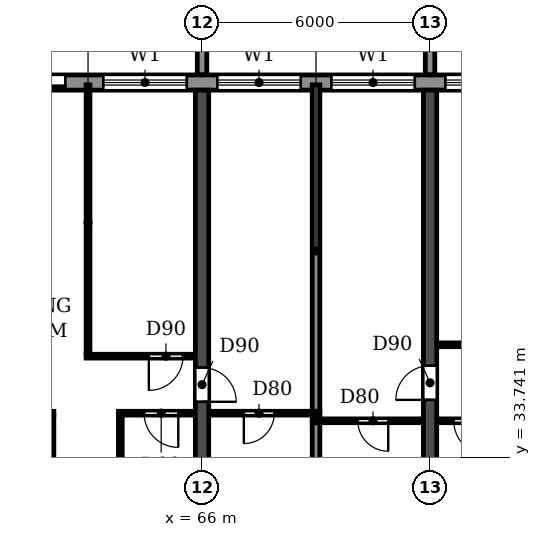
"""IFC4 building model, lengths in metres.
Left out: names, types, materials, properties, quantities, classifications, styles, units other than length and angle.
Written with IfcOpenShell. Run it as: python <this file> out.ifc"""

import sys

from ifc_helpers import new_model, si_unit, direction, frame, frame_2d, origin, place, context, subcontext, project, spatial, polyline, rectangle, outline, extrude, source, transform, mapped, element, fill, save


model = new_model("IFC4")
c1 = context("Model", 3, precision=1e-05, world=origin(), true_north=direction((0.0, 1.0)))
c2 = subcontext(c1, "Body", "Model", "MODEL_VIEW")
j1 = project(units=[si_unit("LENGTHUNIT", "METRE"), si_unit("PLANEANGLEUNIT", "RADIAN")], contexts=[c1])
p1 = place(None, origin())
s1 = spatial("IfcSite", under=j1, at=p1, CompositionType="ELEMENT")
p2 = place(p1, origin())
s2 = spatial("IfcBuilding", under=s1, at=p2, CompositionType="ELEMENT")
p3 = place(p2, frame((0.0, 0.0, 82.8)))
s3 = spatial("IfcBuildingStorey", under=s2, at=p3, CompositionType="ELEMENT", Elevation=82.8)
p4 = place(p3, frame((66.0, 30.525, 0.0), z_axis=(0.0, 0.0, 1.0), x_axis=(0.0, 1.0, 0.0)))
e1 = element("IfcWall", 1, at=p4, inside=s3, PredefinedType="SHEAR", context=c2, shape_type="SweptSolid", body=[
    extrude(rectangle(XDim=12.875, YDim=0.35, at=frame_2d((6.438, 0.0))), origin(), (0.0, 0.0, 1.0), 3.06),
])
p5 = place(p4, frame((4.675, 0.0, 0.0)))
e2 = element("IfcOpeningElement", 2, at=p5, cuts=e1, PredefinedType="OPENING", context=c2, shape_type="SweptSolid", body=[
    extrude(rectangle(XDim=0.9, YDim=2.1, at=frame_2d((0.45, 1.05))), frame((0.0, 0.185, 0.0), z_axis=(0.0, -1.0, 0.0), x_axis=(1.0, 0.0, 0.0)), (0.0, 0.0, 1.0), 0.37),
])
p6 = place(p3, frame((72.0, 30.525, 0.0), z_axis=(0.0, 0.0, 1.0), x_axis=(0.0, 1.0, 0.0)))
e3 = element("IfcWall", 3, at=p6, inside=s3, PredefinedType="SHEAR", context=c2, shape_type="SweptSolid", body=[
    extrude(rectangle(XDim=12.875, YDim=0.35, at=frame_2d((6.438, 0.0))), origin(), (0.0, 0.0, 1.0), 3.06),
])
p7 = place(p6, frame((4.725, 0.0, 0.0)))
e4 = element("IfcOpeningElement", 4, at=p7, cuts=e3, PredefinedType="OPENING", context=c2, shape_type="SweptSolid", body=[
    extrude(rectangle(XDim=0.9, YDim=2.1, at=frame_2d((0.45, 1.05))), frame((0.0, 0.185, 0.0), z_axis=(0.0, -1.0, 0.0), x_axis=(1.0, 0.0, 0.0)), (0.0, 0.0, 1.0), 0.37),
])
p8 = place(p3, frame((91.317, 43.6, 0.0), z_axis=(0.0, 0.0, 1.0), x_axis=(-1.0, 0.0, 0.0)))
e5 = element("IfcWall", 5, at=p8, inside=s3, PredefinedType="STANDARD", context=c2, shape_type="SweptSolid", body=[
    extrude(rectangle(XDim=80.634, YDim=0.4, at=frame_2d((40.317, 0.0))), origin(), (0.0, 0.0, 1.0), 3.06),
])
p9 = place(p8, frame((76.717, 0.0, 0.9)))
e6 = element("IfcOpeningElement", 6, at=p9, cuts=e5, PredefinedType="OPENING", context=c2, shape_type="SweptSolid", body=[
    extrude(rectangle(XDim=2.2, YDim=1.5, at=frame_2d((1.1, 0.75))), frame((0.0, 0.21, 0.0), z_axis=(0.0, -1.0, 0.0), x_axis=(1.0, 0.0, 0.0)), (0.0, 0.0, 1.0), 0.42),
])
p10 = place(p8, frame((73.917, 0.0, 0.0)))
e7 = element("IfcOpeningElement", 7, at=p10, cuts=e5, PredefinedType="OPENING", context=c2, shape_type="SweptSolid", body=[
    extrude(rectangle(XDim=1.8, YDim=2.4, at=frame_2d((0.9, 1.2))), frame((0.0, 0.21, 0.0), z_axis=(0.0, -1.0, 0.0), x_axis=(1.0, 0.0, 0.0)), (0.0, 0.0, 1.0), 0.42),
])
p11 = place(p8, frame((70.717, 0.0, 0.9)))
e8 = element("IfcOpeningElement", 8, at=p11, cuts=e5, PredefinedType="OPENING", context=c2, shape_type="SweptSolid", body=[
    extrude(rectangle(XDim=2.2, YDim=1.5, at=frame_2d((1.1, 0.75))), frame((0.0, 0.21, 0.0), z_axis=(0.0, -1.0, 0.0), x_axis=(1.0, 0.0, 0.0)), (0.0, 0.0, 1.0), 0.42),
])
p12 = place(p8, frame((67.717, 0.0, 0.9)))
e9 = element("IfcOpeningElement", 9, at=p12, cuts=e5, PredefinedType="OPENING", context=c2, shape_type="SweptSolid", body=[
    extrude(rectangle(XDim=2.2, YDim=1.5, at=frame_2d((1.1, 0.75))), frame((0.0, 0.21, 0.0), z_axis=(0.0, -1.0, 0.0), x_axis=(1.0, 0.0, 0.0)), (0.0, 0.0, 1.0), 0.42),
])
p13 = place(p8, frame((64.717, 0.0, 0.9)))
e10 = element("IfcOpeningElement", 10, at=p13, cuts=e5, PredefinedType="OPENING", context=c2, shape_type="SweptSolid", body=[
    extrude(rectangle(XDim=2.2, YDim=1.5, at=frame_2d((1.1, 0.75))), frame((0.0, 0.21, 0.0), z_axis=(0.0, -1.0, 0.0), x_axis=(1.0, 0.0, 0.0)), (0.0, 0.0, 1.0), 0.42),
])
p14 = place(p8, frame((61.917, 0.0, 0.0)))
e11 = element("IfcOpeningElement", 11, at=p14, cuts=e5, PredefinedType="OPENING", context=c2, shape_type="SweptSolid", body=[
    extrude(rectangle(XDim=1.8, YDim=2.4, at=frame_2d((0.9, 1.2))), frame((0.0, 0.21, 0.0), z_axis=(0.0, -1.0, 0.0), x_axis=(1.0, 0.0, 0.0)), (0.0, 0.0, 1.0), 0.42),
])
p15 = place(p8, frame((58.917, 0.0, 0.0)))
e12 = element("IfcOpeningElement", 12, at=p15, cuts=e5, PredefinedType="OPENING", context=c2, shape_type="SweptSolid", body=[
    extrude(rectangle(XDim=1.8, YDim=2.4, at=frame_2d((0.9, 1.2))), frame((0.0, 0.21, 0.0), z_axis=(0.0, -1.0, 0.0), x_axis=(1.0, 0.0, 0.0)), (0.0, 0.0, 1.0), 0.42),
])
p16 = place(p8, frame((55.717, 0.0, 0.9)))
e13 = element("IfcOpeningElement", 13, at=p16, cuts=e5, PredefinedType="OPENING", context=c2, shape_type="SweptSolid", body=[
    extrude(rectangle(XDim=2.2, YDim=1.5, at=frame_2d((1.1, 0.75))), frame((0.0, 0.21, 0.0), z_axis=(0.0, -1.0, 0.0), x_axis=(1.0, 0.0, 0.0)), (0.0, 0.0, 1.0), 0.42),
])
p17 = place(p8, frame((52.717, 0.0, 0.9)))
e14 = element("IfcOpeningElement", 14, at=p17, cuts=e5, PredefinedType="OPENING", context=c2, shape_type="SweptSolid", body=[
    extrude(rectangle(XDim=2.2, YDim=1.5, at=frame_2d((1.1, 0.75))), frame((0.0, 0.21, 0.0), z_axis=(0.0, -1.0, 0.0), x_axis=(1.0, 0.0, 0.0)), (0.0, 0.0, 1.0), 0.42),
])
p18 = place(p8, frame((49.917, 0.0, 0.0)))
e15 = element("IfcOpeningElement", 15, at=p18, cuts=e5, PredefinedType="OPENING", context=c2, shape_type="SweptSolid", body=[
    extrude(rectangle(XDim=1.8, YDim=2.4, at=frame_2d((0.9, 1.2))), frame((0.0, 0.21, 0.0), z_axis=(0.0, -1.0, 0.0), x_axis=(1.0, 0.0, 0.0)), (0.0, 0.0, 1.0), 0.42),
])
p19 = place(p8, frame((46.717, 0.0, 0.9)))
e16 = element("IfcOpeningElement", 16, at=p19, cuts=e5, PredefinedType="OPENING", context=c2, shape_type="SweptSolid", body=[
    extrude(rectangle(XDim=2.2, YDim=1.5, at=frame_2d((1.1, 0.75))), frame((0.0, 0.21, 0.0), z_axis=(0.0, -1.0, 0.0), x_axis=(1.0, 0.0, 0.0)), (0.0, 0.0, 1.0), 0.42),
])
p20 = place(p8, frame((43.717, 0.0, 0.9)))
e17 = element("IfcOpeningElement", 17, at=p20, cuts=e5, PredefinedType="OPENING", context=c2, shape_type="SweptSolid", body=[
    extrude(rectangle(XDim=2.2, YDim=1.5, at=frame_2d((1.1, 0.75))), frame((0.0, 0.21, 0.0), z_axis=(0.0, -1.0, 0.0), x_axis=(1.0, 0.0, 0.0)), (0.0, 0.0, 1.0), 0.42),
])
p21 = place(p8, frame((40.717, 0.0, 0.9)))
e18 = element("IfcOpeningElement", 18, at=p21, cuts=e5, PredefinedType="OPENING", context=c2, shape_type="SweptSolid", body=[
    extrude(rectangle(XDim=2.2, YDim=1.5, at=frame_2d((1.1, 0.75))), frame((0.0, 0.21, 0.0), z_axis=(0.0, -1.0, 0.0), x_axis=(1.0, 0.0, 0.0)), (0.0, 0.0, 1.0), 0.42),
])
p22 = place(p8, frame((37.917, 0.0, 0.0)))
e19 = element("IfcOpeningElement", 19, at=p22, cuts=e5, PredefinedType="OPENING", context=c2, shape_type="SweptSolid", body=[
    extrude(rectangle(XDim=1.8, YDim=2.4, at=frame_2d((0.9, 1.2))), frame((0.0, 0.21, 0.0), z_axis=(0.0, -1.0, 0.0), x_axis=(1.0, 0.0, 0.0)), (0.0, 0.0, 1.0), 0.42),
])
p23 = place(p8, frame((34.717, 0.0, 0.9)))
e20 = element("IfcOpeningElement", 20, at=p23, cuts=e5, PredefinedType="OPENING", context=c2, shape_type="SweptSolid", body=[
    extrude(rectangle(XDim=2.2, YDim=1.5, at=frame_2d((1.1, 0.75))), frame((0.0, 0.21, 0.0), z_axis=(0.0, -1.0, 0.0), x_axis=(1.0, 0.0, 0.0)), (0.0, 0.0, 1.0), 0.42),
])
p24 = place(p8, frame((31.717, 0.0, 0.9)))
e21 = element("IfcOpeningElement", 21, at=p24, cuts=e5, PredefinedType="OPENING", context=c2, shape_type="SweptSolid", body=[
    extrude(rectangle(XDim=2.2, YDim=1.5, at=frame_2d((1.1, 0.75))), frame((0.0, 0.21, 0.0), z_axis=(0.0, -1.0, 0.0), x_axis=(1.0, 0.0, 0.0)), (0.0, 0.0, 1.0), 0.42),
])
p25 = place(p8, frame((28.917, 0.0, 0.0)))
e22 = element("IfcOpeningElement", 22, at=p25, cuts=e5, PredefinedType="OPENING", context=c2, shape_type="SweptSolid", body=[
    extrude(rectangle(XDim=1.8, YDim=2.4, at=frame_2d((0.9, 1.2))), frame((0.0, 0.21, 0.0), z_axis=(0.0, -1.0, 0.0), x_axis=(1.0, 0.0, 0.0)), (0.0, 0.0, 1.0), 0.42),
])
p26 = place(p8, frame((25.717, 0.0, 0.9)))
e23 = element("IfcOpeningElement", 23, at=p26, cuts=e5, PredefinedType="OPENING", context=c2, shape_type="SweptSolid", body=[
    extrude(rectangle(XDim=2.2, YDim=1.5, at=frame_2d((1.1, 0.75))), frame((0.0, 0.21, 0.0), z_axis=(0.0, -1.0, 0.0), x_axis=(1.0, 0.0, 0.0)), (0.0, 0.0, 1.0), 0.42),
])
p27 = place(p8, frame((22.717, 0.0, 0.9)))
e24 = element("IfcOpeningElement", 24, at=p27, cuts=e5, PredefinedType="OPENING", context=c2, shape_type="SweptSolid", body=[
    extrude(rectangle(XDim=2.2, YDim=1.5, at=frame_2d((1.1, 0.75))), frame((0.0, 0.21, 0.0), z_axis=(0.0, -1.0, 0.0), x_axis=(1.0, 0.0, 0.0)), (0.0, 0.0, 1.0), 0.42),
])
p28 = place(p8, frame((19.717, 0.0, 0.9)))
e25 = element("IfcOpeningElement", 25, at=p28, cuts=e5, PredefinedType="OPENING", context=c2, shape_type="SweptSolid", body=[
    extrude(rectangle(XDim=2.2, YDim=1.5, at=frame_2d((1.1, 0.75))), frame((0.0, 0.21, 0.0), z_axis=(0.0, -1.0, 0.0), x_axis=(1.0, 0.0, 0.0)), (0.0, 0.0, 1.0), 0.42),
])
p29 = place(p8, frame((16.717, 0.0, 0.9)))
e26 = element("IfcOpeningElement", 26, at=p29, cuts=e5, PredefinedType="OPENING", context=c2, shape_type="SweptSolid", body=[
    extrude(rectangle(XDim=2.2, YDim=1.5, at=frame_2d((1.1, 0.75))), frame((0.0, 0.21, 0.0), z_axis=(0.0, -1.0, 0.0), x_axis=(1.0, 0.0, 0.0)), (0.0, 0.0, 1.0), 0.42),
])
p30 = place(p8, frame((13.917, 0.0, 0.0)))
e27 = element("IfcOpeningElement", 27, at=p30, cuts=e5, PredefinedType="OPENING", context=c2, shape_type="SweptSolid", body=[
    extrude(rectangle(XDim=1.8, YDim=2.4, at=frame_2d((0.9, 1.2))), frame((0.0, 0.21, 0.0), z_axis=(0.0, -1.0, 0.0), x_axis=(1.0, 0.0, 0.0)), (0.0, 0.0, 1.0), 0.42),
])
p31 = place(p8, frame((10.717, 0.0, 0.9)))
e28 = element("IfcOpeningElement", 28, at=p31, cuts=e5, PredefinedType="OPENING", context=c2, shape_type="SweptSolid", body=[
    extrude(rectangle(XDim=2.2, YDim=1.5, at=frame_2d((1.1, 0.75))), frame((0.0, 0.21, 0.0), z_axis=(0.0, -1.0, 0.0), x_axis=(1.0, 0.0, 0.0)), (0.0, 0.0, 1.0), 0.42),
])
p32 = place(p8, frame((7.717, 0.0, 0.9)))
e29 = element("IfcOpeningElement", 29, at=p32, cuts=e5, PredefinedType="OPENING", context=c2, shape_type="SweptSolid", body=[
    extrude(rectangle(XDim=2.2, YDim=1.5, at=frame_2d((1.1, 0.75))), frame((0.0, 0.21, 0.0), z_axis=(0.0, -1.0, 0.0), x_axis=(1.0, 0.0, 0.0)), (0.0, 0.0, 1.0), 0.42),
])
p33 = place(p8, frame((4.917, 0.0, 0.0)))
e30 = element("IfcOpeningElement", 30, at=p33, cuts=e5, PredefinedType="OPENING", context=c2, shape_type="SweptSolid", body=[
    extrude(rectangle(XDim=1.8, YDim=2.4, at=frame_2d((0.9, 1.2))), frame((0.0, 0.21, 0.0), z_axis=(0.0, -1.0, 0.0), x_axis=(1.0, 0.0, 0.0)), (0.0, 0.0, 1.0), 0.42),
])
p34 = place(p8, frame((1.717, 0.0, 0.9)))
e31 = element("IfcOpeningElement", 31, at=p34, cuts=e5, PredefinedType="OPENING", context=c2, shape_type="SweptSolid", body=[
    extrude(rectangle(XDim=2.2, YDim=1.5, at=frame_2d((1.1, 0.75))), frame((0.0, 0.21, 0.0), z_axis=(0.0, -1.0, 0.0), x_axis=(1.0, 0.0, 0.0)), (0.0, 0.0, 1.0), 0.42),
])
m1 = source(origin(), c2, "Body", "SweptSolid", [
    extrude(outline(polyline([(0.0, 0.0), (0.25, 0.0), (0.25, 3.1), (0.0, 3.1), (0.0, 0.0)])), origin(), (0.0, 0.0, 1.0), 3.1),
])
for number, where in (
    (32, (65.875, 43.8, 0.0)),
    (33, (71.875, 43.8, 0.0)),
):
    element("IfcWall", number, at=place(p3, frame(where)), inside=s3, PredefinedType="STANDARD", context=c2, shape_type="MappedRepresentation", body=[
        mapped(m1, transform((0.0, 0.0, 0.0))),
    ])
p35 = place(p3, frame((69.0, 30.535, 0.0), z_axis=(0.0, 0.0, 1.0), x_axis=(0.0, 1.0, 0.0)))
e34 = element("IfcWall", 34, at=p35, inside=s3, PredefinedType="PARTITIONING", context=c2, shape_type="SweptSolid", body=[
    extrude(rectangle(XDim=4.115, YDim=0.2, at=frame_2d((2.058, 0.0))), origin(), (0.0, 0.0, 1.0), 3.06),
])
p36 = place(p3, frame((69.0, 34.95, 0.0), z_axis=(0.0, 0.0, 1.0), x_axis=(0.0, 1.0, 0.0)))
e35 = element("IfcWall", 35, at=p36, inside=s3, PredefinedType="PARTITIONING", context=c2, shape_type="SweptSolid", body=[
    extrude(rectangle(XDim=8.59, YDim=0.2, at=frame_2d((4.295, 0.0))), origin(), (0.0, 0.0, 1.0), 3.06),
])
p37 = place(p3, frame((68.9, 34.7, 0.0), z_axis=(0.0, 0.0, 1.0), x_axis=(1.0, 0.0, 0.0)))
e36 = element("IfcWall", 36, at=p37, inside=s3, PredefinedType="PARTITIONING", context=c2, shape_type="SweptSolid", body=[
    extrude(rectangle(XDim=2.915, YDim=0.1, at=frame_2d((1.458, 0.0))), origin(), (0.0, 0.0, 1.0), 3.06),
])
p38 = place(p37, frame((1.2, 0.0, 0.0)))
e37 = element("IfcOpeningElement", 37, at=p38, cuts=e36, PredefinedType="OPENING", context=c2, shape_type="SweptSolid", body=[
    extrude(rectangle(XDim=0.8, YDim=2.1, at=frame_2d((0.4, 1.05))), frame((0.0, 0.06, 0.0), z_axis=(0.0, -1.0, 0.0), x_axis=(1.0, 0.0, 0.0)), (0.0, 0.0, 1.0), 0.12),
])
p39 = place(p3, frame((72.185, 34.7, 0.0), z_axis=(0.0, 0.0, 1.0), x_axis=(1.0, 0.0, 0.0)))
e38 = element("IfcWall", 38, at=p39, inside=s3, PredefinedType="PARTITIONING", context=c2, shape_type="SweptSolid", body=[
    extrude(rectangle(XDim=2.015, YDim=0.1, at=frame_2d((1.007, 0.0))), origin(), (0.0, 0.0, 1.0), 3.06),
])
p40 = place(p39, frame((0.44, 0.0, 0.0)))
e39 = element("IfcOpeningElement", 39, at=p40, cuts=e38, PredefinedType="OPENING", context=c2, shape_type="SweptSolid", body=[
    extrude(rectangle(XDim=0.9, YDim=2.1, at=frame_2d((0.45, 1.05))), frame((0.0, 0.06, 0.0), z_axis=(0.0, -1.0, 0.0), x_axis=(1.0, 0.0, 0.0)), (0.0, 0.0, 1.0), 0.12),
])
p41 = place(p3, frame((60.185, 34.9, 0.0), z_axis=(0.0, 0.0, 1.0), x_axis=(1.0, 0.0, 0.0)))
e40 = element("IfcWall", 40, at=p41, inside=s3, PredefinedType="PARTITIONING", context=c2, shape_type="SweptSolid", body=[
    extrude(rectangle(XDim=1.915, YDim=0.1, at=frame_2d((0.958, 0.0))), origin(), (0.0, 0.0, 1.0), 3.06),
])
p42 = place(p41, frame((0.44, 0.0, 0.0)))
e41 = element("IfcOpeningElement", 41, at=p42, cuts=e40, PredefinedType="OPENING", context=c2, shape_type="SweptSolid", body=[
    extrude(rectangle(XDim=0.8, YDim=2.1, at=frame_2d((0.4, 1.05))), frame((0.0, 0.06, 0.0), z_axis=(0.0, -1.0, 0.0), x_axis=(1.0, 0.0, 0.0)), (0.0, 0.0, 1.0), 0.12),
])
p43 = place(p3, frame((63.8, 34.9, 0.0), z_axis=(0.0, 0.0, 1.0), x_axis=(1.0, 0.0, 0.0)))
e42 = element("IfcWall", 42, at=p43, inside=s3, PredefinedType="PARTITIONING", context=c2, shape_type="SweptSolid", body=[
    extrude(rectangle(XDim=2.015, YDim=0.1, at=frame_2d((1.007, 0.0))), origin(), (0.0, 0.0, 1.0), 3.06),
])
p44 = place(p43, frame((0.675, 0.0, 0.0)))
e43 = element("IfcOpeningElement", 43, at=p44, cuts=e42, PredefinedType="OPENING", context=c2, shape_type="SweptSolid", body=[
    extrude(rectangle(XDim=0.9, YDim=2.1, at=frame_2d((0.45, 1.05))), frame((0.0, 0.06, 0.0), z_axis=(0.0, -1.0, 0.0), x_axis=(1.0, 0.0, 0.0)), (0.0, 0.0, 1.0), 0.12),
])
p45 = place(p3, frame((66.185, 34.9, 0.0), z_axis=(0.0, 0.0, 1.0), x_axis=(1.0, 0.0, 0.0)))
e44 = element("IfcWall", 44, at=p45, inside=s3, PredefinedType="PARTITIONING", context=c2, shape_type="SweptSolid", body=[
    extrude(rectangle(XDim=2.915, YDim=0.1, at=frame_2d((1.458, 0.0))), origin(), (0.0, 0.0, 1.0), 3.06),
])
p46 = place(p45, frame((0.915, 0.0, 0.0)))
e45 = element("IfcOpeningElement", 45, at=p46, cuts=e44, PredefinedType="OPENING", context=c2, shape_type="SweptSolid", body=[
    extrude(rectangle(XDim=0.8, YDim=2.1, at=frame_2d((0.4, 1.05))), frame((0.0, 0.06, 0.0), z_axis=(0.0, -1.0, 0.0), x_axis=(1.0, 0.0, 0.0)), (0.0, 0.0, 1.0), 0.12),
])
p47 = place(p3, frame((62.95, 36.4, 0.0), z_axis=(0.0, 0.0, 1.0), x_axis=(1.0, 0.0, 0.0)))
e46 = element("IfcWall", 46, at=p47, inside=s3, PredefinedType="PARTITIONING", context=c2, shape_type="SweptSolid", body=[
    extrude(rectangle(XDim=2.865, YDim=0.1, at=frame_2d((1.433, 0.0))), origin(), (0.0, 0.0, 1.0), 3.06),
])
p48 = place(p47, frame((1.65, 0.0, 0.0)))
e47 = element("IfcOpeningElement", 47, at=p48, cuts=e46, PredefinedType="OPENING", context=c2, shape_type="SweptSolid", body=[
    extrude(rectangle(XDim=0.9, YDim=2.1, at=frame_2d((0.45, 1.05))), frame((0.0, 0.06, 0.0), z_axis=(0.0, -1.0, 0.0), x_axis=(1.0, 0.0, 0.0)), (0.0, 0.0, 1.0), 0.12),
])
p49 = place(p3, frame((72.185, 36.7, 0.0), z_axis=(0.0, 0.0, 1.0), x_axis=(1.0, 0.0, 0.0)))
e48 = element("IfcWall", 48, at=p49, inside=s3, PredefinedType="PARTITIONING", context=c2, shape_type="SweptSolid", body=[
    extrude(rectangle(XDim=2.865, YDim=0.1, at=frame_2d((1.433, 0.0))), origin(), (0.0, 0.0, 1.0), 3.06),
])
p50 = place(p49, frame((1.415, 0.0, 0.0)))
e49 = element("IfcOpeningElement", 49, at=p50, cuts=e48, PredefinedType="OPENING", context=c2, shape_type="SweptSolid", body=[
    extrude(rectangle(XDim=0.9, YDim=2.1, at=frame_2d((0.45, 1.05))), frame((0.0, 0.06, 0.0), z_axis=(0.0, -1.0, 0.0), x_axis=(1.0, 0.0, 0.0)), (0.0, 0.0, 1.0), 0.12),
])
p51 = place(p3, frame((62.05, 30.535, 0.0), z_axis=(0.0, 0.0, 1.0), x_axis=(0.0, 1.0, 0.0)))
e50 = element("IfcWall", 50, at=p51, inside=s3, PredefinedType="PARTITIONING", context=c2, shape_type="SweptSolid", body=[
    extrude(rectangle(XDim=4.315, YDim=0.1, at=frame_2d((2.158, 0.0))), origin(), (0.0, 0.0, 1.0), 3.06),
])
p52 = place(p3, frame((63.0, 36.45, 0.0), z_axis=(0.0, 0.0, 1.0), x_axis=(0.0, 1.0, 0.0)))
e51 = element("IfcWall", 51, at=p52, inside=s3, PredefinedType="PARTITIONING", context=c2, shape_type="SweptSolid", body=[
    extrude(rectangle(XDim=7.09, YDim=0.1, at=frame_2d((3.545, 0.0))), origin(), (0.0, 0.0, 1.0), 3.06),
])
p53 = place(p3, frame((63.85, 30.535, 0.0), z_axis=(0.0, 0.0, 1.0), x_axis=(0.0, 1.0, 0.0)))
e52 = element("IfcWall", 52, at=p53, inside=s3, PredefinedType="PARTITIONING", context=c2, shape_type="SweptSolid", body=[
    extrude(rectangle(XDim=4.315, YDim=0.1, at=frame_2d((2.158, 0.0))), origin(), (0.0, 0.0, 1.0), 3.06),
])
p54 = place(p25, origin())
e53 = element("IfcDoor", 53, at=p54, inside=s3, OperationType="DOUBLE_DOOR_SLIDING", PredefinedType="DOOR", context=c2, shape_type="SweptSolid", body=[
    extrude(rectangle(XDim=1.8, YDim=2.4, at=frame_2d((0.9, 1.2))), frame((0.0, 0.025, 0.0), z_axis=(0.0, -1.0, 0.0), x_axis=(1.0, 0.0, 0.0)), (0.0, 0.0, 1.0), 0.05),
])
fill(e22, e53)
p55 = place(p26, origin())
e54 = element("IfcWindow", 54, at=p55, inside=s3, PartitioningType="DOUBLE_PANEL_HORIZONTAL", PredefinedType="WINDOW", context=c2, shape_type="SweptSolid", body=[
    extrude(rectangle(XDim=2.2, YDim=1.5, at=frame_2d((1.1, 0.75))), frame((0.0, 0.03, 0.0), z_axis=(0.0, -1.0, 0.0), x_axis=(1.0, 0.0, 0.0)), (0.0, 0.0, 1.0), 0.06),
])
fill(e23, e54)
p56 = place(p27, origin())
e55 = element("IfcWindow", 55, at=p56, inside=s3, PartitioningType="DOUBLE_PANEL_HORIZONTAL", PredefinedType="WINDOW", context=c2, shape_type="SweptSolid", body=[
    extrude(rectangle(XDim=2.2, YDim=1.5, at=frame_2d((1.1, 0.75))), frame((0.0, 0.03, 0.0), z_axis=(0.0, -1.0, 0.0), x_axis=(1.0, 0.0, 0.0)), (0.0, 0.0, 1.0), 0.06),
])
fill(e24, e55)
p57 = place(p28, origin())
e56 = element("IfcWindow", 56, at=p57, inside=s3, PartitioningType="DOUBLE_PANEL_HORIZONTAL", PredefinedType="WINDOW", context=c2, shape_type="SweptSolid", body=[
    extrude(rectangle(XDim=2.2, YDim=1.5, at=frame_2d((1.1, 0.75))), frame((0.0, 0.03, 0.0), z_axis=(0.0, -1.0, 0.0), x_axis=(1.0, 0.0, 0.0)), (0.0, 0.0, 1.0), 0.06),
])
fill(e25, e56)
p58 = place(p29, origin())
e57 = element("IfcWindow", 57, at=p58, inside=s3, PartitioningType="DOUBLE_PANEL_HORIZONTAL", PredefinedType="WINDOW", context=c2, shape_type="SweptSolid", body=[
    extrude(rectangle(XDim=2.2, YDim=1.5, at=frame_2d((1.1, 0.75))), frame((0.0, 0.03, 0.0), z_axis=(0.0, -1.0, 0.0), x_axis=(1.0, 0.0, 0.0)), (0.0, 0.0, 1.0), 0.06),
])
fill(e26, e57)
p59 = place(p46, frame((0.8, 0.0, 0.0), z_axis=(0.0, 0.0, 1.0), x_axis=(-1.0, 0.0, 0.0)))
e58 = element("IfcDoor", 58, at=p59, inside=s3, OperationType="SINGLE_SWING_RIGHT", PredefinedType="DOOR", context=c2, shape_type="SweptSolid", body=[
    extrude(rectangle(XDim=0.8, YDim=2.1, at=frame_2d((0.4, 1.05))), frame((0.0, 0.025, 0.0), z_axis=(0.0, -1.0, 0.0), x_axis=(1.0, 0.0, 0.0)), (0.0, 0.0, 1.0), 0.05),
])
fill(e45, e58)
p60 = place(p44, frame((0.9, 0.0, 0.0), z_axis=(0.0, 0.0, 1.0), x_axis=(-1.0, 0.0, 0.0)))
e59 = element("IfcDoor", 59, at=p60, inside=s3, OperationType="SINGLE_SWING_LEFT", PredefinedType="DOOR", context=c2, shape_type="SweptSolid", body=[
    extrude(rectangle(XDim=0.9, YDim=2.1, at=frame_2d((0.45, 1.05))), frame((0.0, 0.025, 0.0), z_axis=(0.0, -1.0, 0.0), x_axis=(1.0, 0.0, 0.0)), (0.0, 0.0, 1.0), 0.05),
])
fill(e43, e59)
p61 = place(p48, frame((0.9, 0.0, 0.0), z_axis=(0.0, 0.0, 1.0), x_axis=(-1.0, 0.0, 0.0)))
e60 = element("IfcDoor", 60, at=p61, inside=s3, OperationType="SINGLE_SWING_RIGHT", PredefinedType="DOOR", context=c2, shape_type="SweptSolid", body=[
    extrude(rectangle(XDim=0.9, YDim=2.1, at=frame_2d((0.45, 1.05))), frame((0.0, 0.025, 0.0), z_axis=(0.0, -1.0, 0.0), x_axis=(1.0, 0.0, 0.0)), (0.0, 0.0, 1.0), 0.05),
])
fill(e47, e60)
p62 = place(p5, frame((0.9, 0.0, 0.0), z_axis=(0.0, 0.0, 1.0), x_axis=(-1.0, 0.0, 0.0)))
e61 = element("IfcDoor", 61, at=p62, inside=s3, OperationType="SINGLE_SWING_RIGHT", PredefinedType="DOOR", context=c2, shape_type="SweptSolid", body=[
    extrude(rectangle(XDim=0.9, YDim=2.1, at=frame_2d((0.45, 1.05))), frame((0.0, 0.025, 0.0), z_axis=(0.0, -1.0, 0.0), x_axis=(1.0, 0.0, 0.0)), (0.0, 0.0, 1.0), 0.05),
])
fill(e2, e61)
p63 = place(p38, frame((0.8, 0.0, 0.0), z_axis=(0.0, 0.0, 1.0), x_axis=(-1.0, 0.0, 0.0)))
e62 = element("IfcDoor", 62, at=p63, inside=s3, OperationType="SINGLE_SWING_LEFT", PredefinedType="DOOR", context=c2, shape_type="SweptSolid", body=[
    extrude(rectangle(XDim=0.8, YDim=2.1, at=frame_2d((0.4, 1.05))), frame((0.0, 0.025, 0.0), z_axis=(0.0, -1.0, 0.0), x_axis=(1.0, 0.0, 0.0)), (0.0, 0.0, 1.0), 0.05),
])
fill(e37, e62)
p64 = place(p7, origin())
e63 = element("IfcDoor", 63, at=p64, inside=s3, OperationType="SINGLE_SWING_LEFT", PredefinedType="DOOR", context=c2, shape_type="SweptSolid", body=[
    extrude(rectangle(XDim=0.9, YDim=2.1, at=frame_2d((0.45, 1.05))), frame((0.0, 0.025, 0.0), z_axis=(0.0, -1.0, 0.0), x_axis=(1.0, 0.0, 0.0)), (0.0, 0.0, 1.0), 0.05),
])
fill(e4, e63)
p65 = place(p40, frame((0.9, 0.0, 0.0), z_axis=(0.0, 0.0, 1.0), x_axis=(-1.0, 0.0, 0.0)))
e64 = element("IfcDoor", 64, at=p65, inside=s3, OperationType="SINGLE_SWING_LEFT", PredefinedType="DOOR", context=c2, shape_type="SweptSolid", body=[
    extrude(rectangle(XDim=0.9, YDim=2.1, at=frame_2d((0.45, 1.05))), frame((0.0, 0.025, 0.0), z_axis=(0.0, -1.0, 0.0), x_axis=(1.0, 0.0, 0.0)), (0.0, 0.0, 1.0), 0.05),
])
fill(e39, e64)
save(model, sys.argv[1])
